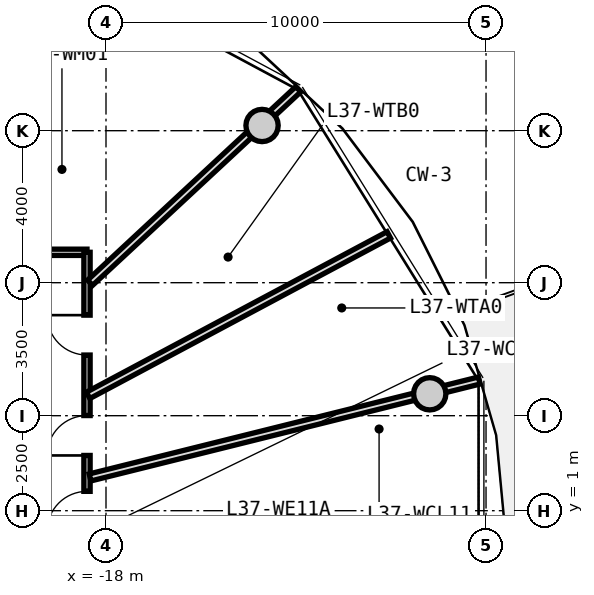
"""IFC4 building model, lengths in metres.
Left out: names, types, materials, properties, quantities, classifications, styles, units other than length and angle.
Written with IfcOpenShell. Run it as: python <this file> out.ifc"""

import sys

from ifc_helpers import new_model, si_unit, direction, frame, frame_2d, origin, origin_2d, place, context, subcontext, project, spatial, rectangle, circle, extrude, source, transform, mapped, element, fill, save


model = new_model("IFC4")
c1 = context("Model", 3, precision=1e-05, world=origin(), true_north=direction((0.0, 1.0)))
c2 = subcontext(c1, "Body", "Model", "MODEL_VIEW")
j1 = project(units=[si_unit("LENGTHUNIT", "METRE"), si_unit("PLANEANGLEUNIT", "RADIAN")], contexts=[c1])
p1 = place(None, origin())
s1 = spatial("IfcSite", under=j1, at=p1, CompositionType="ELEMENT")
p2 = place(p1, origin())
s2 = spatial("IfcBuilding", under=s1, at=p2, CompositionType="ELEMENT")
p3 = place(p2, frame((0.0, 0.0, 120.65)))
s3 = spatial("IfcBuildingStorey", under=s2, at=p3, CompositionType="ELEMENT", Elevation=120.65)
m1 = source(origin(), c2, "Body", "SweptSolid", [
    extrude(circle(Radius=0.425, at=origin_2d()), origin(), (0.0, 0.0, 1.0), 3.05),
])
for number, where, z_axis, x_axis in (
    (1, (-9.481, 4.076, 0.0), (0.0, 0.0, 1.0), (1.0, 0.0, 0.0)),
    (2, (-13.894, 11.137, 0.0), (0.0, 0.0, 1.0), (1.0, 0.0, 0.0)),
):
    element("IfcColumn", number, at=place(p3, frame(where, z_axis=z_axis, x_axis=x_axis)), inside=s3, PredefinedType="COLUMN", context=c2, shape_type="MappedRepresentation", body=[
        mapped(m1, transform((0.0, 0.0, 0.0), x_axis=(1.0, 0.0, 0.0), y_axis=(0.0, 1.0, 0.0), z_axis=(0.0, 0.0, 1.0), scale=1.0)),
    ])
m2 = source(origin(), c2, "Body", "SweptSolid", [
    extrude(rectangle(XDim=8.6, YDim=0.165, at=frame_2d((4.3, 0.0))), origin(), (0.0, 0.0, 1.0), 2.775),
])
p4 = place(p3, frame((-27.1, 7.8, 0.0), z_axis=(0.0, 0.0, 1.0), x_axis=(1.0, 0.0, 0.0)))
e3 = element("IfcWall", 3, at=p4, inside=s3, PredefinedType="PARTITIONING", context=c2, shape_type="MappedRepresentation", body=[
    mapped(m2, transform((0.0, 0.0, 0.0), x_axis=(1.0, 0.0, 0.0), y_axis=(0.0, 1.0, 0.0), z_axis=(0.0, 0.0, 1.0), scale=1.0)),
])
p5 = place(p4, frame((5.275, 0.0, 0.0)))
e4 = element("IfcOpeningElement", 4, at=p5, cuts=e3, PredefinedType="OPENING", context=c2, shape_type="SweptSolid", body=[
    extrude(rectangle(XDim=1.25, YDim=2.2, at=frame_2d((0.625, 1.1))), frame((0.0, 0.093, 0.0), z_axis=(0.0, -1.0, 0.0), x_axis=(1.0, 0.0, 0.0)), (0.0, 0.0, 1.0), 0.185),
])
m3 = source(origin(), c2, "Body", "SweptSolid", [
    extrude(rectangle(XDim=15.6, YDim=0.165, at=frame_2d((7.8, 0.0))), origin(), (0.0, 0.0, 1.0), 2.775),
])
p6 = place(p3, frame((-18.5, 7.8, 0.0), z_axis=(0.0, 0.0, 1.0), x_axis=(0.0, -1.0, 0.0)))
e5 = element("IfcWall", 5, at=p6, inside=s3, PredefinedType="PARTITIONING", context=c2, shape_type="MappedRepresentation", body=[
    mapped(m3, transform((0.0, 0.0, 0.0), x_axis=(1.0, 0.0, 0.0), y_axis=(0.0, 1.0, 0.0), z_axis=(0.0, 0.0, 1.0), scale=1.0)),
])
p7 = place(p6, frame((12.002, 0.0, 0.0)))
e6 = element("IfcOpeningElement", 6, at=p7, cuts=e5, PredefinedType="OPENING", context=c2, shape_type="SweptSolid", body=[
    extrude(rectangle(XDim=1.05, YDim=2.15, at=frame_2d((0.525, 1.075))), frame((0.0, 0.093, 0.0), z_axis=(0.0, -1.0, 0.0), x_axis=(1.0, 0.0, 0.0)), (0.0, 0.0, 1.0), 0.185),
])
p8 = place(p6, frame((10.211, 0.0, 0.0)))
e7 = element("IfcOpeningElement", 7, at=p8, cuts=e5, PredefinedType="OPENING", context=c2, shape_type="SweptSolid", body=[
    extrude(rectangle(XDim=1.05, YDim=2.15, at=frame_2d((0.525, 1.075))), frame((0.0, 0.093, 0.0), z_axis=(0.0, -1.0, 0.0), x_axis=(1.0, 0.0, 0.0)), (0.0, 0.0, 1.0), 0.185),
])
p9 = place(p6, frame((7.722, 0.0, 0.0)))
e8 = element("IfcOpeningElement", 8, at=p9, cuts=e5, PredefinedType="OPENING", context=c2, shape_type="SweptSolid", body=[
    extrude(rectangle(XDim=1.05, YDim=2.15, at=frame_2d((0.525, 1.075))), frame((0.0, 0.093, 0.0), z_axis=(0.0, -1.0, 0.0), x_axis=(1.0, 0.0, 0.0)), (0.0, 0.0, 1.0), 0.185),
])
p10 = place(p6, frame((6.291, 0.0, 0.0)))
e9 = element("IfcOpeningElement", 9, at=p10, cuts=e5, PredefinedType="OPENING", context=c2, shape_type="SweptSolid", body=[
    extrude(rectangle(XDim=1.05, YDim=2.15, at=frame_2d((0.525, 1.075))), frame((0.0, 0.093, 0.0), z_axis=(0.0, -1.0, 0.0), x_axis=(1.0, 0.0, 0.0)), (0.0, 0.0, 1.0), 0.185),
])
p11 = place(p6, frame((4.296, 0.0, 0.0)))
e10 = element("IfcOpeningElement", 10, at=p11, cuts=e5, PredefinedType="OPENING", context=c2, shape_type="SweptSolid", body=[
    extrude(rectangle(XDim=1.05, YDim=2.15, at=frame_2d((0.525, 1.075))), frame((0.0, 0.093, 0.0), z_axis=(0.0, -1.0, 0.0), x_axis=(1.0, 0.0, 0.0)), (0.0, 0.0, 1.0), 0.185),
])
p12 = place(p6, frame((1.654, 0.0, 0.0)))
e11 = element("IfcOpeningElement", 11, at=p12, cuts=e5, PredefinedType="OPENING", context=c2, shape_type="SweptSolid", body=[
    extrude(rectangle(XDim=1.05, YDim=2.15, at=frame_2d((0.525, 1.075))), frame((0.0, 0.093, 0.0), z_axis=(0.0, -1.0, 0.0), x_axis=(1.0, 0.0, 0.0)), (0.0, 0.0, 1.0), 0.185),
])
m4 = source(origin(), c2, "Body", "SweptSolid", [
    extrude(rectangle(XDim=10.556, YDim=0.19, at=frame_2d((5.278, 0.0))), origin(), (0.0, 0.0, 1.0), 2.275),
])
p13 = place(p3, frame((-18.42, 1.875, 0.0), z_axis=(0.0, 0.0, 1.0), x_axis=(0.970363857851, 0.241648470667, 0.0)))
e12 = element("IfcWall", 12, at=p13, inside=s3, PredefinedType="PARTITIONING", context=c2, shape_type="MappedRepresentation", body=[
    mapped(m4, transform((0.0, 0.0, 0.0), x_axis=(1.0, 0.0, 0.0), y_axis=(0.0, 1.0, 0.0), z_axis=(0.0, 0.0, 1.0), scale=1.0)),
])
m5 = source(origin(), c2, "Body", "SweptSolid", [
    extrude(rectangle(XDim=7.482, YDim=0.19, at=frame_2d((3.741, 0.0))), origin(), (0.0, 0.0, 1.0), 2.275),
])
p14 = place(p3, frame((-18.42, 6.998, 0.0), z_axis=(0.0, 0.0, 1.0), x_axis=(0.732508698043, 0.680757671489, 0.0)))
e13 = element("IfcWall", 13, at=p14, inside=s3, PredefinedType="PARTITIONING", context=c2, shape_type="MappedRepresentation", body=[
    mapped(m5, transform((0.0, 0.0, 0.0), x_axis=(1.0, 0.0, 0.0), y_axis=(0.0, 1.0, 0.0), z_axis=(0.0, 0.0, 1.0), scale=1.0)),
])
m6 = source(origin(), c2, "Body", "SweptSolid", [
    extrude(rectangle(XDim=8.968, YDim=0.19, at=frame_2d((4.484, 0.0))), origin(), (0.0, 0.0, 1.0), 2.775),
])
p15 = place(p3, frame((-18.47, 4.036, 0.0), z_axis=(0.0, 0.0, 1.0), x_axis=(0.882202936563, 0.47086938605, 0.0)))
e14 = element("IfcWall", 14, at=p15, inside=s3, PredefinedType="PARTITIONING", context=c2, shape_type="MappedRepresentation", body=[
    mapped(m6, transform((0.0, 0.0, 0.0), x_axis=(1.0, 0.0, 0.0), y_axis=(0.0, 1.0, 0.0), z_axis=(0.0, 0.0, 1.0), scale=1.0)),
])
m7 = source(origin(), c2, "Body", "SweptSolid", [
    extrude(rectangle(XDim=1.05, YDim=2.15, at=frame_2d((0.525, 1.075))), frame((0.0, 0.025, 0.0), z_axis=(0.0, -1.0, 0.0), x_axis=(1.0, 0.0, 0.0)), (0.0, 0.0, 1.0), 0.05),
])
p16 = place(p10, frame((1.05, 0.0, 0.0), z_axis=(0.0, 0.0, 1.0), x_axis=(-1.0, 0.0, 0.0)))
e15 = element("IfcDoor", 15, at=p16, inside=s3, OperationType="SINGLE_SWING_LEFT", PredefinedType="DOOR", context=c2, shape_type="MappedRepresentation", body=[
    mapped(m7, transform((0.0, 0.0, 0.0), x_axis=(1.0, 0.0, 0.0), y_axis=(0.0, 1.0, 0.0), z_axis=(0.0, 0.0, 1.0), scale=1.0)),
])
fill(e9, e15)
p17 = place(p11, frame((1.05, 0.0, 0.0), z_axis=(0.0, 0.0, 1.0), x_axis=(-1.0, 0.0, 0.0)))
e16 = element("IfcDoor", 16, at=p17, inside=s3, OperationType="SINGLE_SWING_LEFT", PredefinedType="DOOR", context=c2, shape_type="MappedRepresentation", body=[
    mapped(m7, transform((0.0, 0.0, 0.0), x_axis=(1.0, 0.0, 0.0), y_axis=(0.0, 1.0, 0.0), z_axis=(0.0, 0.0, 1.0), scale=1.0)),
])
fill(e10, e16)
p18 = place(p12, frame((1.05, 0.0, 0.0), z_axis=(0.0, 0.0, 1.0), x_axis=(-1.0, 0.0, 0.0)))
e17 = element("IfcDoor", 17, at=p18, inside=s3, OperationType="SINGLE_SWING_RIGHT", PredefinedType="DOOR", context=c2, shape_type="MappedRepresentation", body=[
    mapped(m7, transform((0.0, 0.0, 0.0), x_axis=(1.0, 0.0, 0.0), y_axis=(0.0, 1.0, 0.0), z_axis=(0.0, 0.0, 1.0), scale=1.0)),
])
fill(e11, e17)
save(model, sys.argv[1])
